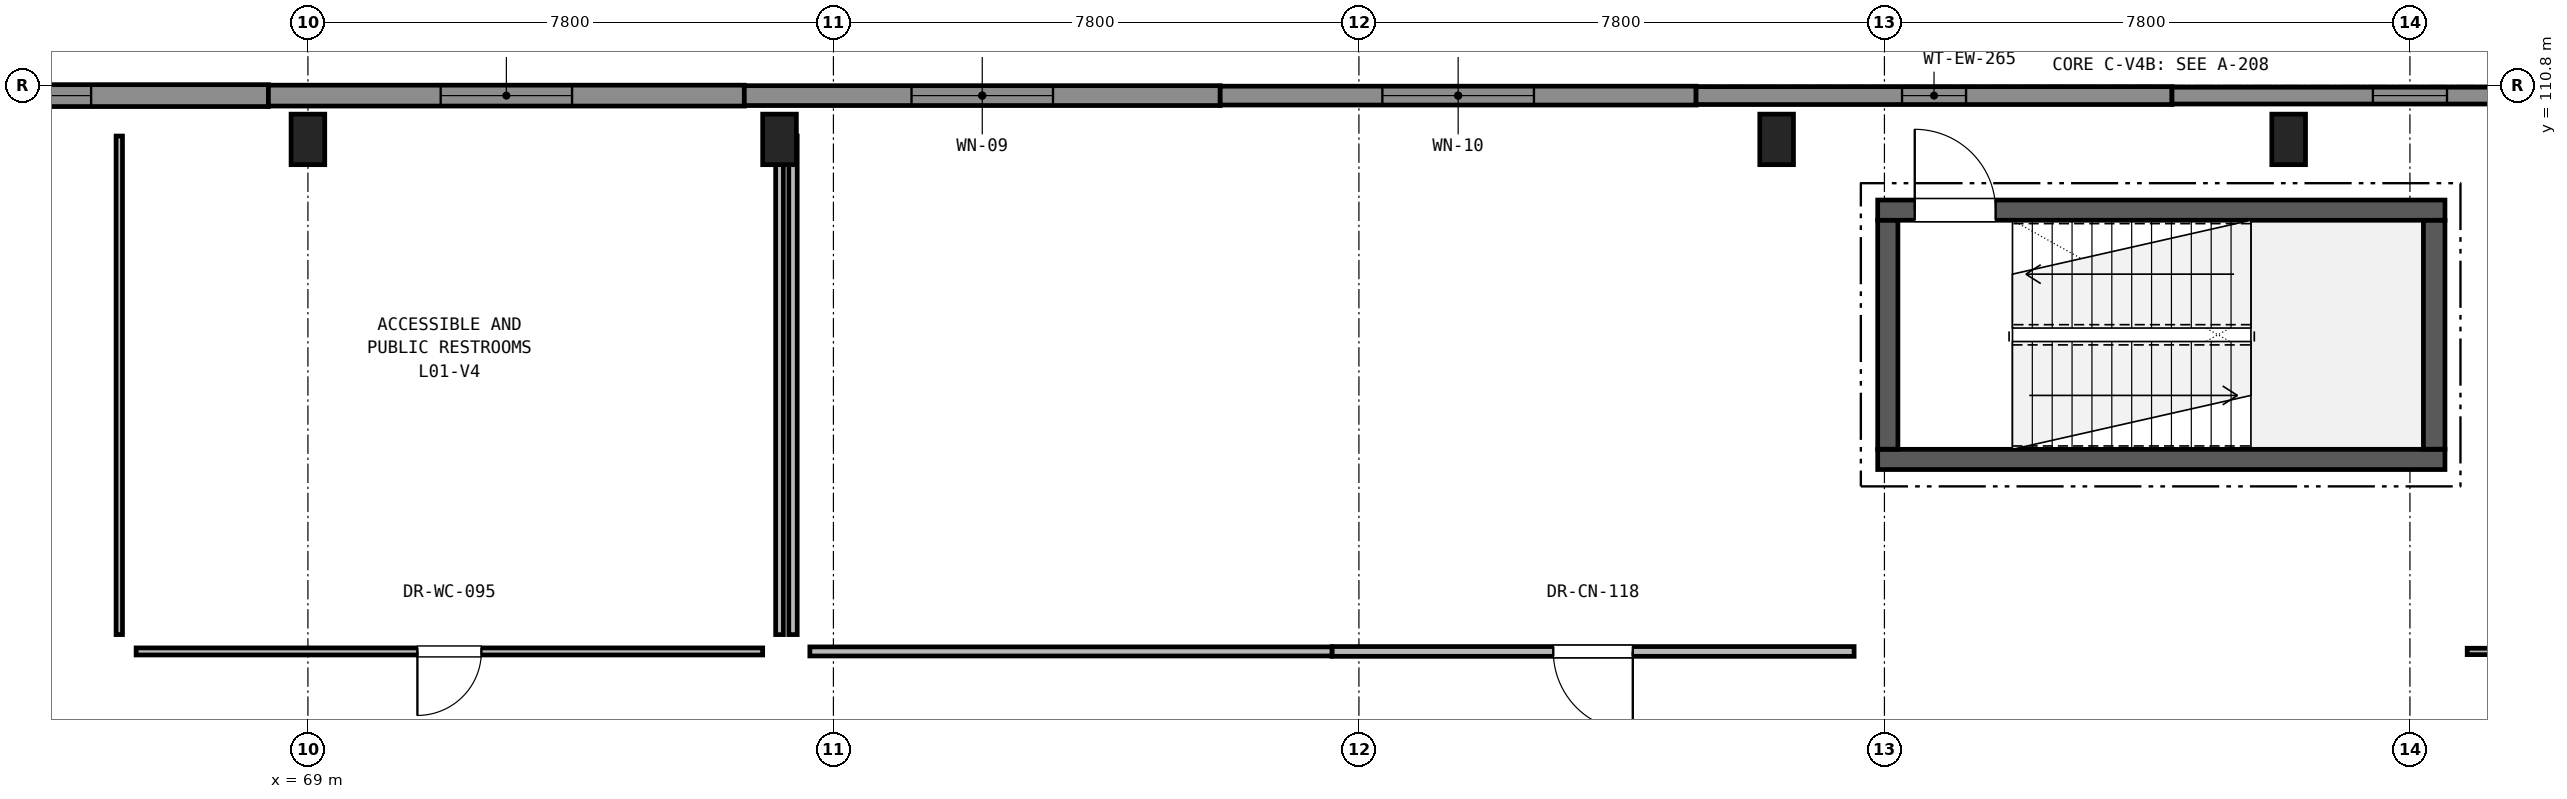
"""IFC4 building model, lengths in metres.
Left out: names, types, materials, properties, quantities, classifications, styles, units other than length and angle.
Written with IfcOpenShell. Run it as: python <this file> out.ifc"""

import sys

from ifc_helpers import new_model, si_unit, direction, frame, frame_2d, origin, origin_2d, place, context, subcontext, project, spatial, rectangle, extrude, element, fill, save


model = new_model("IFC4")
c1 = context("Model", 3, precision=1e-05, world=origin(), true_north=direction((0.0, 1.0)))
c2 = subcontext(c1, "Body", "Model", "MODEL_VIEW")
j1 = project(units=[si_unit("LENGTHUNIT", "METRE"), si_unit("PLANEANGLEUNIT", "RADIAN")], contexts=[c1])
p1 = place(None, origin())
s1 = spatial("IfcSite", under=j1, at=p1, CompositionType="ELEMENT")
p2 = place(p1, origin())
s2 = spatial("IfcBuilding", under=s1, at=p2, CompositionType="ELEMENT")
p3 = place(p2, frame((0.0, 0.0, 5.1)))
s3 = spatial("IfcBuildingStorey", under=s2, at=p3, CompositionType="ELEMENT", Elevation=5.1)
for number, where, z_axis, x_axis in (
    (1, (69.0, 110.0, 0.0), (0.0, 0.0, 1.0), (1.0, 0.0, 0.0)),
    (2, (76.0, 110.0, 0.0), (0.0, 0.0, 1.0), (1.0, 0.0, 0.0)),
    (3, (90.8, 110.0, 0.0), (0.0, 0.0, 1.0), (1.0, 0.0, 0.0)),
    (4, (98.4, 110.0, 0.0), (0.0, 0.0, 1.0), (1.0, 0.0, 0.0)),
):
    element("IfcColumn", number, at=place(p3, frame(where, z_axis=z_axis, x_axis=x_axis)), inside=s3, PredefinedType="COLUMN", context=c2, shape_type="SweptSolid", body=[
        extrude(rectangle(XDim=0.5, YDim=0.75, at=origin_2d()), origin(), (0.0, 0.0, 1.0), 4.42),
    ])
p4 = place(p3, frame((61.35, 110.65, 0.0), z_axis=(0.0, 0.0, 1.0), x_axis=(1.0, 0.0, 0.0)))
e5 = element("IfcWall", 5, at=p4, inside=s3, PredefinedType="SOLIDWALL", context=c2, shape_type="SweptSolid", body=[
    extrude(rectangle(XDim=7.063, YDim=0.325, at=frame_2d((3.532, 0.0))), origin(), (0.0, 0.0, 1.0), 4.145),
])
p5 = place(p4, frame((2.632, 0.0, 0.9)))
e6 = element("IfcOpeningElement", 6, at=p5, cuts=e5, PredefinedType="OPENING", context=c2, shape_type="SweptSolid", body=[
    extrude(rectangle(XDim=1.8, YDim=1.5, at=frame_2d((0.9, 0.75))), frame((0.0, 0.172, 0.0), z_axis=(0.0, -1.0, 0.0), x_axis=(1.0, 0.0, 0.0)), (0.0, 0.0, 1.0), 0.345),
])
p6 = place(p3, frame((68.414, 110.65, 0.0), z_axis=(0.0, 0.0, 1.0), x_axis=(1.0, 0.0, 0.0)))
e7 = element("IfcWall", 7, at=p6, inside=s3, PredefinedType="SOLIDWALL", context=c2, shape_type="SweptSolid", body=[
    extrude(rectangle(XDim=7.064, YDim=0.31, at=frame_2d((3.532, 0.0))), origin(), (0.0, 0.0, 1.0), 4.145),
])
p7 = place(p6, frame((2.557, 0.0, 0.9)))
e8 = element("IfcOpeningElement", 8, at=p7, cuts=e7, PredefinedType="OPENING", context=c2, shape_type="SweptSolid", body=[
    extrude(rectangle(XDim=1.95, YDim=1.5, at=frame_2d((0.975, 0.75))), frame((0.0, 0.165, 0.0), z_axis=(0.0, -1.0, 0.0), x_axis=(1.0, 0.0, 0.0)), (0.0, 0.0, 1.0), 0.33),
])
p8 = place(p3, frame((75.477, 110.65, 0.0), z_axis=(0.0, 0.0, 1.0), x_axis=(1.0, 0.0, 0.0)))
e9 = element("IfcWall", 9, at=p8, inside=s3, PredefinedType="SOLIDWALL", context=c2, shape_type="SweptSolid", body=[
    extrude(rectangle(XDim=7.064, YDim=0.295, at=frame_2d((3.532, 0.0))), origin(), (0.0, 0.0, 1.0), 4.145),
])
p9 = place(p8, frame((2.482, 0.0, 0.9)))
e10 = element("IfcOpeningElement", 10, at=p9, cuts=e9, PredefinedType="OPENING", context=c2, shape_type="SweptSolid", body=[
    extrude(rectangle(XDim=2.1, YDim=1.5, at=frame_2d((1.05, 0.75))), frame((0.0, 0.157, 0.0), z_axis=(0.0, -1.0, 0.0), x_axis=(1.0, 0.0, 0.0)), (0.0, 0.0, 1.0), 0.315),
])
p10 = place(p3, frame((82.541, 110.65, 0.0), z_axis=(0.0, 0.0, 1.0), x_axis=(1.0, 0.0, 0.0)))
e11 = element("IfcWall", 11, at=p10, inside=s3, PredefinedType="SOLIDWALL", context=c2, shape_type="SweptSolid", body=[
    extrude(rectangle(XDim=7.063, YDim=0.28, at=frame_2d((3.532, 0.0))), origin(), (0.0, 0.0, 1.0), 4.145),
])
p11 = place(p10, frame((2.407, 0.0, 0.9)))
e12 = element("IfcOpeningElement", 12, at=p11, cuts=e11, PredefinedType="OPENING", context=c2, shape_type="SweptSolid", body=[
    extrude(rectangle(XDim=2.25, YDim=1.5, at=frame_2d((1.125, 0.75))), frame((0.0, 0.15, 0.0), z_axis=(0.0, -1.0, 0.0), x_axis=(1.0, 0.0, 0.0)), (0.0, 0.0, 1.0), 0.3),
])
p12 = place(p3, frame((89.604, 110.65, 0.0), z_axis=(0.0, 0.0, 1.0), x_axis=(1.0, 0.0, 0.0)))
e13 = element("IfcWall", 13, at=p12, inside=s3, PredefinedType="SOLIDWALL", context=c2, shape_type="SweptSolid", body=[
    extrude(rectangle(XDim=7.064, YDim=0.265, at=frame_2d((3.532, 0.0))), origin(), (0.0, 0.0, 1.0), 4.145),
])
p13 = place(p12, frame((3.057, 0.0, 0.9)))
e14 = element("IfcOpeningElement", 14, at=p13, cuts=e13, PredefinedType="OPENING", context=c2, shape_type="SweptSolid", body=[
    extrude(rectangle(XDim=0.95, YDim=1.75, at=frame_2d((0.475, 0.875))), frame((0.0, 0.142, 0.0), z_axis=(0.0, -1.0, 0.0), x_axis=(1.0, 0.0, 0.0)), (0.0, 0.0, 1.0), 0.285),
])
p14 = place(p3, frame((96.668, 110.65, 0.0), z_axis=(0.0, 0.0, 1.0), x_axis=(1.0, 0.0, 0.0)))
e15 = element("IfcWall", 15, at=p14, inside=s3, PredefinedType="SOLIDWALL", context=c2, shape_type="SweptSolid", body=[
    extrude(rectangle(XDim=7.063, YDim=0.25, at=frame_2d((3.532, 0.0))), origin(), (0.0, 0.0, 1.0), 4.145),
])
p15 = place(p14, frame((2.982, 0.0, 0.9)))
e16 = element("IfcOpeningElement", 16, at=p15, cuts=e15, PredefinedType="OPENING", context=c2, shape_type="SweptSolid", body=[
    extrude(rectangle(XDim=1.1, YDim=1.75, at=frame_2d((0.55, 0.875))), frame((0.0, 0.135, 0.0), z_axis=(0.0, -1.0, 0.0), x_axis=(1.0, 0.0, 0.0)), (0.0, 0.0, 1.0), 0.27),
])
p16 = place(p3, frame((92.3, 105.25, 0.0), z_axis=(0.0, 0.0, 1.0), x_axis=(1.0, 0.0, 0.0)))
e17 = element("IfcWall", 17, at=p16, inside=s3, PredefinedType="SHEAR", context=c2, shape_type="SweptSolid", body=[
    extrude(rectangle(XDim=8.42, YDim=0.3, at=frame_2d((4.21, 0.0))), origin(), (0.0, 0.0, 1.0), 4.145),
])
p17 = place(p3, frame((92.3, 108.95, 0.0), z_axis=(0.0, 0.0, 1.0), x_axis=(1.0, 0.0, 0.0)))
e18 = element("IfcWall", 18, at=p17, inside=s3, PredefinedType="SHEAR", context=c2, shape_type="SweptSolid", body=[
    extrude(rectangle(XDim=8.42, YDim=0.3, at=frame_2d((4.21, 0.0))), origin(), (0.0, 0.0, 1.0), 4.145),
])
p18 = place(p17, frame((0.55, 0.0, 0.0)))
e19 = element("IfcOpeningElement", 19, at=p18, cuts=e18, PredefinedType="OPENING", context=c2, shape_type="SweptSolid", body=[
    extrude(rectangle(XDim=1.2, YDim=2.2, at=frame_2d((0.6, 1.1))), frame((0.0, 0.16, 0.0), z_axis=(0.0, -1.0, 0.0), x_axis=(1.0, 0.0, 0.0)), (0.0, 0.0, 1.0), 0.32),
])
p19 = place(p3, frame((92.45, 105.402, 0.0), z_axis=(0.0, 0.0, 1.0), x_axis=(0.0, 1.0, 0.0)))
e20 = element("IfcWall", 20, at=p19, inside=s3, PredefinedType="SHEAR", context=c2, shape_type="SweptSolid", body=[
    extrude(rectangle(XDim=3.396, YDim=0.3, at=frame_2d((1.698, 0.0))), origin(), (0.0, 0.0, 1.0), 4.145),
])
p20 = place(p3, frame((100.56, 105.402, 0.0), z_axis=(0.0, 0.0, 1.0), x_axis=(0.0, 1.0, 0.0)))
e21 = element("IfcWall", 21, at=p20, inside=s3, PredefinedType="SHEAR", context=c2, shape_type="SweptSolid", body=[
    extrude(rectangle(XDim=3.396, YDim=0.32, at=frame_2d((1.698, 0.0))), origin(), (0.0, 0.0, 1.0), 4.145),
])
p21 = place(p3, frame((76.0, 110.05, 0.0), z_axis=(0.0, 0.0, 1.0), x_axis=(0.0, -1.0, 0.0)))
e22 = element("IfcWall", 22, at=p21, inside=s3, PredefinedType="PARTITIONING", context=c2, shape_type="SweptSolid", body=[
    extrude(rectangle(XDim=7.4, YDim=0.115, at=frame_2d((3.7, 0.0))), origin(), (0.0, 0.0, 1.0), 3.445),
])
p22 = place(p3, frame((75.75, 102.4, 0.0), z_axis=(0.0, 0.0, 1.0), x_axis=(-1.0, 0.0, 0.0)))
e23 = element("IfcWall", 23, at=p22, inside=s3, PredefinedType="PARTITIONING", context=c2, shape_type="SweptSolid", body=[
    extrude(rectangle(XDim=9.3, YDim=0.105, at=frame_2d((4.65, 0.0))), origin(), (0.0, 0.0, 1.0), 3.345),
])
p23 = place(p22, frame((4.175, 0.0, 0.0)))
e24 = element("IfcOpeningElement", 24, at=p23, cuts=e23, PredefinedType="OPENING", context=c2, shape_type="SweptSolid", body=[
    extrude(rectangle(XDim=0.95, YDim=2.15, at=frame_2d((0.475, 1.075))), frame((0.0, 0.062, 0.0), z_axis=(0.0, -1.0, 0.0), x_axis=(1.0, 0.0, 0.0)), (0.0, 0.0, 1.0), 0.125),
])
p24 = place(p3, frame((66.2, 102.65, 0.0), z_axis=(0.0, 0.0, 1.0), x_axis=(0.0, 1.0, 0.0)))
e25 = element("IfcWall", 25, at=p24, inside=s3, PredefinedType="PARTITIONING", context=c2, shape_type="SweptSolid", body=[
    extrude(rectangle(XDim=7.4, YDim=0.095, at=frame_2d((3.7, 0.0))), origin(), (0.0, 0.0, 1.0), 3.595),
])
p25 = place(p3, frame((91.95, 102.4, 0.0), z_axis=(0.0, 0.0, 1.0), x_axis=(-1.0, 0.0, 0.0)))
e26 = element("IfcWall", 26, at=p25, inside=s3, PredefinedType="PARTITIONING", context=c2, shape_type="SweptSolid", body=[
    extrude(rectangle(XDim=7.75, YDim=0.145, at=frame_2d((3.875, 0.0))), origin(), (0.0, 0.0, 1.0), 3.545),
])
p26 = place(p25, frame((3.285, 0.0, 0.0)))
e27 = element("IfcOpeningElement", 27, at=p26, cuts=e26, PredefinedType="OPENING", context=c2, shape_type="SweptSolid", body=[
    extrude(rectangle(XDim=1.18, YDim=2.2, at=frame_2d((0.59, 1.1))), frame((0.0, 0.083, 0.0), z_axis=(0.0, -1.0, 0.0), x_axis=(1.0, 0.0, 0.0)), (0.0, 0.0, 1.0), 0.165),
])
p27 = place(p3, frame((84.2, 102.4, 0.0), z_axis=(0.0, 0.0, 1.0), x_axis=(-1.0, 0.0, 0.0)))
e28 = element("IfcWall", 28, at=p27, inside=s3, PredefinedType="PARTITIONING", context=c2, shape_type="SweptSolid", body=[
    extrude(rectangle(XDim=7.75, YDim=0.135, at=frame_2d((3.875, 0.0))), origin(), (0.0, 0.0, 1.0), 4.145),
])
p28 = place(p3, frame((76.2, 102.65, 0.0), z_axis=(0.0, 0.0, 1.0), x_axis=(0.0, 1.0, 0.0)))
e29 = element("IfcWall", 29, at=p28, inside=s3, PredefinedType="PARTITIONING", context=c2, shape_type="SweptSolid", body=[
    extrude(rectangle(XDim=7.4, YDim=0.125, at=frame_2d((3.7, 0.0))), origin(), (0.0, 0.0, 1.0), 3.445),
])
p29 = place(p3, frame((106.483, 102.4, 0.0), z_axis=(0.0, 0.0, 1.0), x_axis=(-1.0, 0.0, 0.0)))
e30 = element("IfcWall", 30, at=p29, inside=s3, PredefinedType="PARTITIONING", context=c2, shape_type="SweptSolid", body=[
    extrude(rectangle(XDim=5.433, YDim=0.095, at=frame_2d((2.716, 0.0))), origin(), (0.0, 0.0, 1.0), 3.495),
])
p30 = place(p5, origin())
e31 = element("IfcWindow", 31, at=p30, inside=s3, PartitioningType="SINGLE_PANEL", PredefinedType="WINDOW", context=c2, shape_type="SweptSolid", body=[
    extrude(rectangle(XDim=1.8, YDim=1.5, at=frame_2d((0.9, 0.75))), frame((0.0, 0.03, 0.0), z_axis=(0.0, -1.0, 0.0), x_axis=(1.0, 0.0, 0.0)), (0.0, 0.0, 1.0), 0.06),
])
fill(e6, e31)
p31 = place(p7, origin())
e32 = element("IfcWindow", 32, at=p31, inside=s3, PartitioningType="SINGLE_PANEL", PredefinedType="WINDOW", context=c2, shape_type="SweptSolid", body=[
    extrude(rectangle(XDim=1.95, YDim=1.5, at=frame_2d((0.975, 0.75))), frame((0.0, 0.03, 0.0), z_axis=(0.0, -1.0, 0.0), x_axis=(1.0, 0.0, 0.0)), (0.0, 0.0, 1.0), 0.06),
])
fill(e8, e32)
p32 = place(p9, origin())
e33 = element("IfcWindow", 33, at=p32, inside=s3, PartitioningType="SINGLE_PANEL", PredefinedType="WINDOW", context=c2, shape_type="SweptSolid", body=[
    extrude(rectangle(XDim=2.1, YDim=1.5, at=frame_2d((1.05, 0.75))), frame((0.0, 0.03, 0.0), z_axis=(0.0, -1.0, 0.0), x_axis=(1.0, 0.0, 0.0)), (0.0, 0.0, 1.0), 0.06),
])
fill(e10, e33)
p33 = place(p11, origin())
e34 = element("IfcWindow", 34, at=p33, inside=s3, PartitioningType="SINGLE_PANEL", PredefinedType="WINDOW", context=c2, shape_type="SweptSolid", body=[
    extrude(rectangle(XDim=2.25, YDim=1.5, at=frame_2d((1.125, 0.75))), frame((0.0, 0.03, 0.0), z_axis=(0.0, -1.0, 0.0), x_axis=(1.0, 0.0, 0.0)), (0.0, 0.0, 1.0), 0.06),
])
fill(e12, e34)
p34 = place(p13, origin())
e35 = element("IfcWindow", 35, at=p34, inside=s3, PartitioningType="SINGLE_PANEL", PredefinedType="WINDOW", context=c2, shape_type="SweptSolid", body=[
    extrude(rectangle(XDim=0.95, YDim=1.75, at=frame_2d((0.475, 0.875))), frame((0.0, 0.03, 0.0), z_axis=(0.0, -1.0, 0.0), x_axis=(1.0, 0.0, 0.0)), (0.0, 0.0, 1.0), 0.06),
])
fill(e14, e35)
p35 = place(p15, origin())
e36 = element("IfcWindow", 36, at=p35, inside=s3, PartitioningType="SINGLE_PANEL", PredefinedType="WINDOW", context=c2, shape_type="SweptSolid", body=[
    extrude(rectangle(XDim=1.1, YDim=1.75, at=frame_2d((0.55, 0.875))), frame((0.0, 0.03, 0.0), z_axis=(0.0, -1.0, 0.0), x_axis=(1.0, 0.0, 0.0)), (0.0, 0.0, 1.0), 0.06),
])
fill(e16, e36)
p36 = place(p18, origin())
e37 = element("IfcDoor", 37, at=p36, inside=s3, OperationType="SINGLE_SWING_LEFT", PredefinedType="DOOR", context=c2, shape_type="SweptSolid", body=[
    extrude(rectangle(XDim=1.2, YDim=2.2, at=frame_2d((0.6, 1.1))), frame((0.0, 0.025, 0.0), z_axis=(0.0, -1.0, 0.0), x_axis=(1.0, 0.0, 0.0)), (0.0, 0.0, 1.0), 0.05),
])
fill(e19, e37)
p37 = place(p23, origin())
e38 = element("IfcDoor", 38, at=p37, inside=s3, OperationType="SINGLE_SWING_RIGHT", PredefinedType="DOOR", context=c2, shape_type="SweptSolid", body=[
    extrude(rectangle(XDim=0.95, YDim=2.15, at=frame_2d((0.475, 1.075))), frame((0.0, 0.025, 0.0), z_axis=(0.0, -1.0, 0.0), x_axis=(1.0, 0.0, 0.0)), (0.0, 0.0, 1.0), 0.05),
])
fill(e24, e38)
p38 = place(p26, origin())
e39 = element("IfcDoor", 39, at=p38, inside=s3, OperationType="SINGLE_SWING_LEFT", PredefinedType="DOOR", context=c2, shape_type="SweptSolid", body=[
    extrude(rectangle(XDim=1.18, YDim=2.2, at=frame_2d((0.59, 1.1))), frame((0.0, 0.025, 0.0), z_axis=(0.0, -1.0, 0.0), x_axis=(1.0, 0.0, 0.0)), (0.0, 0.0, 1.0), 0.05),
])
fill(e27, e39)
save(model, sys.argv[1])
